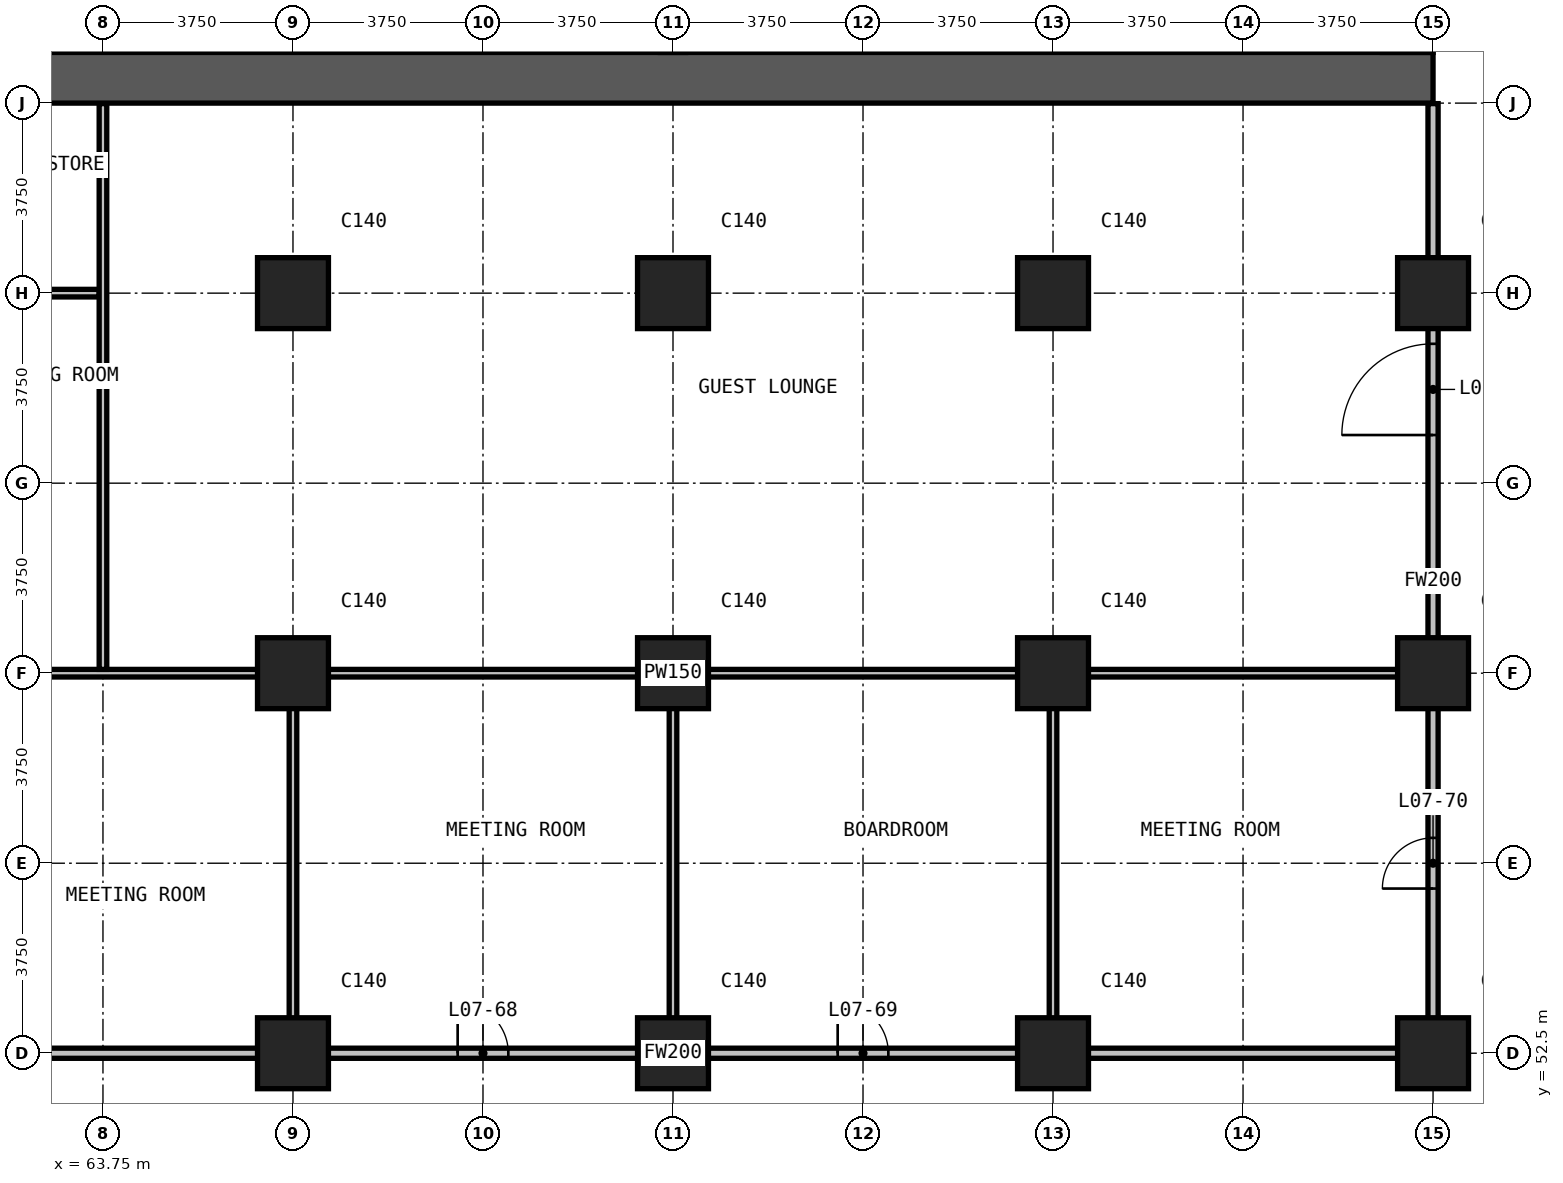
"""IFC4 building model, lengths in metres.
Left out: names, types, materials, properties, quantities, classifications, styles, units other than length and angle.
Written with IfcOpenShell. Run it as: python <this file> out.ifc"""

import sys

from ifc_helpers import new_model, si_unit, direction, frame, frame_2d, origin, origin_2d, place, context, subcontext, project, spatial, rectangle, extrude, element, fill, save


model = new_model("IFC4")
c1 = context("Model", 3, precision=1e-05, world=origin(), true_north=direction((0.0, 1.0)))
c2 = subcontext(c1, "Body", "Model", "MODEL_VIEW")
j1 = project(units=[si_unit("LENGTHUNIT", "METRE"), si_unit("PLANEANGLEUNIT", "RADIAN")], contexts=[c1])
p1 = place(None, origin())
s1 = spatial("IfcSite", under=j1, at=p1, CompositionType="ELEMENT")
p2 = place(p1, origin())
s2 = spatial("IfcBuilding", under=s1, at=p2, CompositionType="ELEMENT")
p3 = place(p2, frame((0.0, 0.0, 42.8)))
s3 = spatial("IfcBuildingStorey", under=s2, at=p3, CompositionType="ELEMENT", Elevation=42.8)
for number, where, z_axis, x_axis in (
    (1, (67.5, 52.5, 0.0), (0.0, 0.0, 1.0), (1.0, 0.0, 0.0)),
    (2, (67.5, 60.0, 0.0), (0.0, 0.0, 1.0), (1.0, 0.0, 0.0)),
    (3, (67.5, 67.5, 0.0), (0.0, 0.0, 1.0), (1.0, 0.0, 0.0)),
    (4, (75.0, 52.5, 0.0), (0.0, 0.0, 1.0), (1.0, 0.0, 0.0)),
    (5, (75.0, 60.0, 0.0), (0.0, 0.0, 1.0), (1.0, 0.0, 0.0)),
    (6, (75.0, 67.5, 0.0), (0.0, 0.0, 1.0), (1.0, 0.0, 0.0)),
    (7, (82.5, 52.5, 0.0), (0.0, 0.0, 1.0), (1.0, 0.0, 0.0)),
    (8, (82.5, 60.0, 0.0), (0.0, 0.0, 1.0), (1.0, 0.0, 0.0)),
    (9, (82.5, 67.5, 0.0), (0.0, 0.0, 1.0), (1.0, 0.0, 0.0)),
    (10, (90.0, 52.5, 0.0), (0.0, 0.0, 1.0), (1.0, 0.0, 0.0)),
    (11, (90.0, 60.0, 0.0), (0.0, 0.0, 1.0), (1.0, 0.0, 0.0)),
    (12, (90.0, 67.5, 0.0), (0.0, 0.0, 1.0), (1.0, 0.0, 0.0)),
):
    element("IfcColumn", number, at=place(p3, frame(where, z_axis=z_axis, x_axis=x_axis)), inside=s3, PredefinedType="COLUMN", context=c2, shape_type="SweptSolid", body=[
        extrude(rectangle(XDim=1.4, YDim=1.4, at=origin_2d()), origin(), (0.0, 0.0, 1.0), 3.3),
    ])
p4 = place(p3, frame((60.0, 71.75, 0.0), z_axis=(0.0, 0.0, 1.0), x_axis=(1.0, 0.0, 0.0)))
e13 = element("IfcWall", 13, at=p4, inside=s3, PredefinedType="SHEAR", context=c2, shape_type="SweptSolid", body=[
    extrude(rectangle(XDim=30.0, YDim=1.0, at=frame_2d((15.0, 0.0))), origin(), (0.0, 0.0, 1.0), 3.3),
])
p5 = place(p3, frame((60.1, 52.5, 0.0), z_axis=(0.0, 0.0, 1.0), x_axis=(1.0, 0.0, 0.0)))
e14 = element("IfcWall", 14, at=p5, inside=s3, PredefinedType="PARTITIONING", context=c2, shape_type="SweptSolid", body=[
    extrude(rectangle(XDim=29.8, YDim=0.2, at=frame_2d((14.9, 0.0))), origin(), (0.0, 0.0, 1.0), 3.0),
])
p6 = place(p5, frame((10.65, 0.0, 0.0)))
e15 = element("IfcOpeningElement", 15, at=p6, cuts=e14, PredefinedType="OPENING", context=c2, shape_type="SweptSolid", body=[
    extrude(rectangle(XDim=1.0, YDim=2.2, at=frame_2d((0.5, 1.1))), frame((0.0, 0.11, 0.0), z_axis=(0.0, -1.0, 0.0), x_axis=(1.0, 0.0, 0.0)), (0.0, 0.0, 1.0), 0.22),
])
p7 = place(p5, frame((18.15, 0.0, 0.0)))
e16 = element("IfcOpeningElement", 16, at=p7, cuts=e14, PredefinedType="OPENING", context=c2, shape_type="SweptSolid", body=[
    extrude(rectangle(XDim=1.0, YDim=2.2, at=frame_2d((0.5, 1.1))), frame((0.0, 0.11, 0.0), z_axis=(0.0, -1.0, 0.0), x_axis=(1.0, 0.0, 0.0)), (0.0, 0.0, 1.0), 0.22),
])
p8 = place(p3, frame((90.0, 52.4, 0.0), z_axis=(0.0, 0.0, 1.0), x_axis=(0.0, 1.0, 0.0)))
e17 = element("IfcWall", 17, at=p8, inside=s3, PredefinedType="PARTITIONING", context=c2, shape_type="SweptSolid", body=[
    extrude(rectangle(XDim=18.84, YDim=0.2, at=frame_2d((9.42, 0.0))), origin(), (0.0, 0.0, 1.0), 3.0),
])
p9 = place(p8, frame((3.35, 0.0, 0.0)))
e18 = element("IfcOpeningElement", 18, at=p9, cuts=e17, PredefinedType="OPENING", context=c2, shape_type="SweptSolid", body=[
    extrude(rectangle(XDim=1.0, YDim=2.2, at=frame_2d((0.5, 1.1))), frame((0.0, 0.11, 0.0), z_axis=(0.0, -1.0, 0.0), x_axis=(1.0, 0.0, 0.0)), (0.0, 0.0, 1.0), 0.22),
])
p10 = place(p8, frame((12.3, 0.0, 0.0)))
e19 = element("IfcOpeningElement", 19, at=p10, cuts=e17, PredefinedType="OPENING", context=c2, shape_type="SweptSolid", body=[
    extrude(rectangle(XDim=1.8, YDim=2.2, at=frame_2d((0.9, 1.1))), frame((0.0, 0.11, 0.0), z_axis=(0.0, -1.0, 0.0), x_axis=(1.0, 0.0, 0.0)), (0.0, 0.0, 1.0), 0.22),
])
p11 = place(p3, frame((60.1, 60.0, 0.0), z_axis=(0.0, 0.0, 1.0), x_axis=(1.0, 0.0, 0.0)))
e20 = element("IfcWall", 20, at=p11, inside=s3, PredefinedType="PARTITIONING", context=c2, shape_type="SweptSolid", body=[
    extrude(rectangle(XDim=29.8, YDim=0.15, at=frame_2d((14.9, 0.0))), origin(), (0.0, 0.0, 1.0), 3.0),
])
p12 = place(p3, frame((60.1, 67.5, 0.0), z_axis=(0.0, 0.0, 1.0), x_axis=(1.0, 0.0, 0.0)))
e21 = element("IfcWall", 21, at=p12, inside=s3, PredefinedType="PARTITIONING", context=c2, shape_type="SweptSolid", body=[
    extrude(rectangle(XDim=3.575, YDim=0.15, at=frame_2d((1.788, 0.0))), origin(), (0.0, 0.0, 1.0), 3.0),
])
p13 = place(p3, frame((63.75, 60.075, 0.0), z_axis=(0.0, 0.0, 1.0), x_axis=(0.0, 1.0, 0.0)))
e22 = element("IfcWall", 22, at=p13, inside=s3, PredefinedType="PARTITIONING", context=c2, shape_type="SweptSolid", body=[
    extrude(rectangle(XDim=11.165, YDim=0.15, at=frame_2d((5.583, 0.0))), origin(), (0.0, 0.0, 1.0), 3.0),
])
for number, where, z_axis, x_axis in (
    (23, (67.5, 52.6, 0.0), (0.0, 0.0, 1.0), (0.0, 1.0, 0.0)),
    (24, (75.0, 52.6, 0.0), (0.0, 0.0, 1.0), (0.0, 1.0, 0.0)),
    (25, (82.5, 52.6, 0.0), (0.0, 0.0, 1.0), (0.0, 1.0, 0.0)),
):
    element("IfcWall", number, at=place(p3, frame(where, z_axis=z_axis, x_axis=x_axis)), inside=s3, PredefinedType="PARTITIONING", context=c2, shape_type="SweptSolid", body=[
        extrude(rectangle(XDim=7.325, YDim=0.15, at=frame_2d((3.663, 0.0))), origin(), (0.0, 0.0, 1.0), 3.0),
    ])
p14 = place(p6, origin())
e26 = element("IfcDoor", 26, at=p14, inside=s3, OperationType="SINGLE_SWING_LEFT", PredefinedType="DOOR", context=c2, shape_type="SweptSolid", body=[
    extrude(rectangle(XDim=1.0, YDim=2.2, at=frame_2d((0.5, 1.1))), frame((0.0, 0.025, 0.0), z_axis=(0.0, -1.0, 0.0), x_axis=(1.0, 0.0, 0.0)), (0.0, 0.0, 1.0), 0.05),
])
fill(e15, e26)
p15 = place(p7, origin())
e27 = element("IfcDoor", 27, at=p15, inside=s3, OperationType="SINGLE_SWING_LEFT", PredefinedType="DOOR", context=c2, shape_type="SweptSolid", body=[
    extrude(rectangle(XDim=1.0, YDim=2.2, at=frame_2d((0.5, 1.1))), frame((0.0, 0.025, 0.0), z_axis=(0.0, -1.0, 0.0), x_axis=(1.0, 0.0, 0.0)), (0.0, 0.0, 1.0), 0.05),
])
fill(e16, e27)
p16 = place(p9, origin())
e28 = element("IfcDoor", 28, at=p16, inside=s3, OperationType="SINGLE_SWING_RIGHT", PredefinedType="DOOR", context=c2, shape_type="SweptSolid", body=[
    extrude(rectangle(XDim=1.0, YDim=2.2, at=frame_2d((0.5, 1.1))), frame((0.0, 0.025, 0.0), z_axis=(0.0, -1.0, 0.0), x_axis=(1.0, 0.0, 0.0)), (0.0, 0.0, 1.0), 0.05),
])
fill(e18, e28)
p17 = place(p10, origin())
e29 = element("IfcDoor", 29, at=p17, inside=s3, OperationType="DOUBLE_DOOR_SINGLE_SWING", PredefinedType="DOOR", context=c2, shape_type="SweptSolid", body=[
    extrude(rectangle(XDim=1.8, YDim=2.2, at=frame_2d((0.9, 1.1))), frame((0.0, 0.025, 0.0), z_axis=(0.0, -1.0, 0.0), x_axis=(1.0, 0.0, 0.0)), (0.0, 0.0, 1.0), 0.05),
])
fill(e19, e29)
save(model, sys.argv[1])
